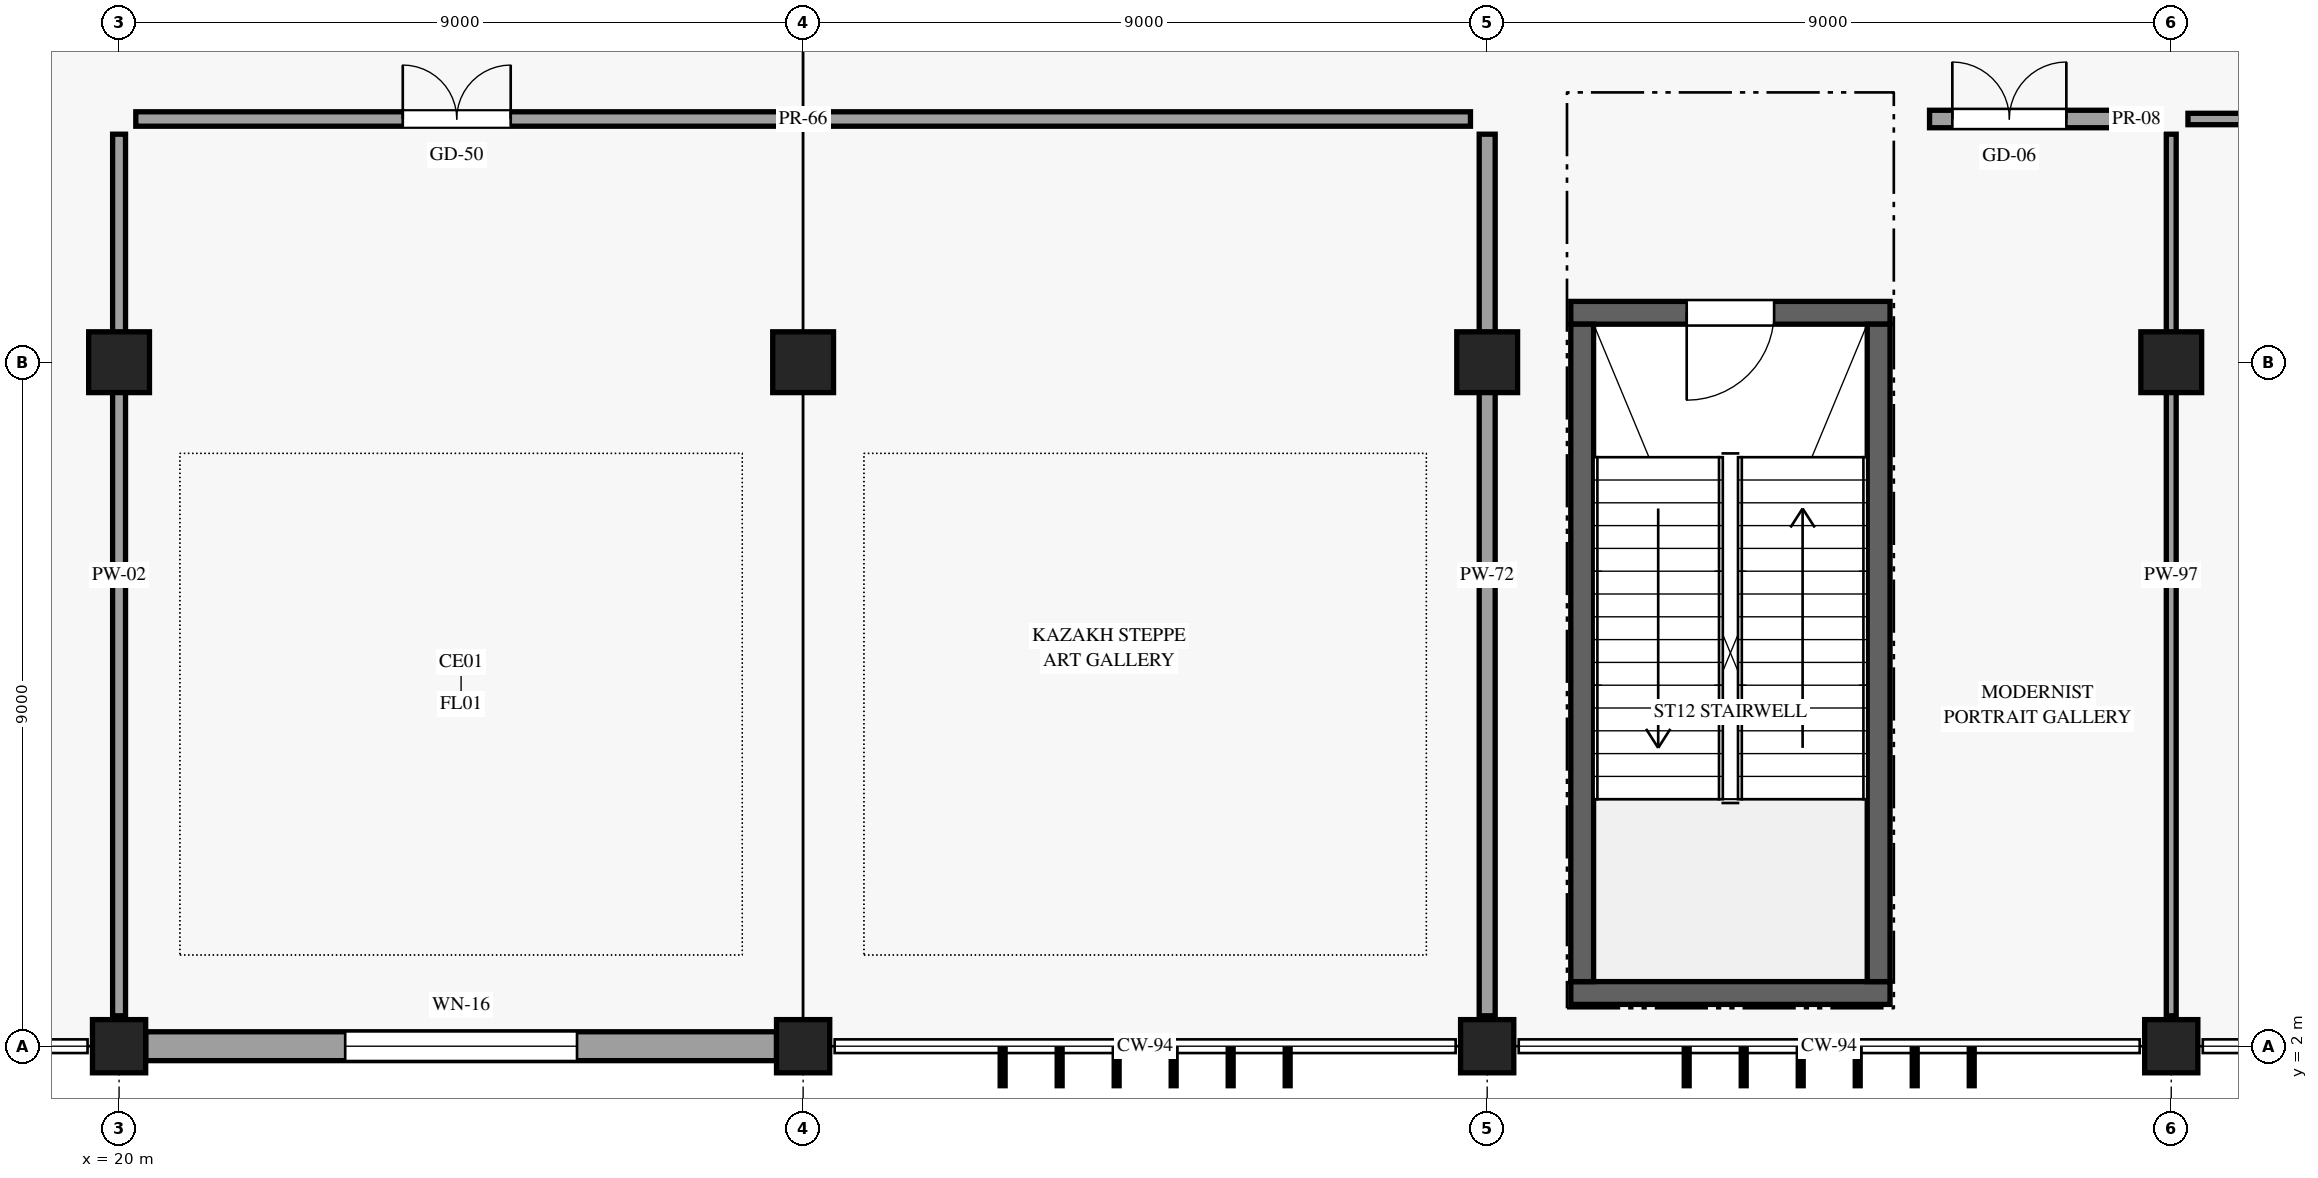
"""IFC4 building model, lengths in metres.
Left out: names, types, materials, properties, quantities, classifications, styles, units other than length and angle.
Written with IfcOpenShell. Run it as: python <this file> out.ifc"""

import sys

from ifc_helpers import new_model, si_unit, direction, frame, frame_2d, origin, origin_2d, place, context, subcontext, project, spatial, rectangle, circle, extrude, element, fill, save


model = new_model("IFC4")
c1 = context("Model", 3, precision=1e-05, world=origin(), true_north=direction((0.0, 1.0)))
c2 = subcontext(c1, "Body", "Model", "MODEL_VIEW")
j1 = project(units=[si_unit("LENGTHUNIT", "METRE"), si_unit("PLANEANGLEUNIT", "RADIAN")], contexts=[c1])
p1 = place(None, origin())
s1 = spatial("IfcSite", under=j1, at=p1, CompositionType="ELEMENT")
p2 = place(p1, origin())
s2 = spatial("IfcBuilding", under=s1, at=p2, CompositionType="ELEMENT")
p3 = place(p2, frame((0.0, 0.0, 5.4)))
s3 = spatial("IfcBuildingStorey", under=s2, at=p3, CompositionType="ELEMENT", Elevation=5.4)
p4 = place(p3, frame((20.0, 2.0, 0.0), z_axis=(0.0, 0.0, 1.0), x_axis=(1.0, 0.0, 0.0)))
e1 = element("IfcColumn", 1, at=p4, inside=s3, PredefinedType="COLUMN", context=c2, shape_type="SweptSolid", body=[
    extrude(rectangle(XDim=0.7, YDim=0.7, at=origin_2d()), origin(), (0.0, 0.0, 1.0), 4.8),
])
p5 = place(p3, frame((20.0, 11.0, 0.0), z_axis=(0.0, 0.0, 1.0), x_axis=(1.0, 0.0, 0.0)))
e2 = element("IfcColumn", 2, at=p5, inside=s3, PredefinedType="COLUMN", context=c2, shape_type="SweptSolid", body=[
    extrude(circle(Radius=0.4, at=origin_2d()), origin(), (0.0, 0.0, 1.0), 4.8),
])
p6 = place(p3, frame((29.0, 2.0, 0.0), z_axis=(0.0, 0.0, 1.0), x_axis=(1.0, 0.0, 0.0)))
e3 = element("IfcColumn", 3, at=p6, inside=s3, PredefinedType="COLUMN", context=c2, shape_type="SweptSolid", body=[
    extrude(rectangle(XDim=0.7, YDim=0.7, at=origin_2d()), origin(), (0.0, 0.0, 1.0), 4.8),
])
p7 = place(p3, frame((29.0, 11.0, 0.0), z_axis=(0.0, 0.0, 1.0), x_axis=(1.0, 0.0, 0.0)))
e4 = element("IfcColumn", 4, at=p7, inside=s3, PredefinedType="COLUMN", context=c2, shape_type="SweptSolid", body=[
    extrude(circle(Radius=0.4, at=origin_2d()), origin(), (0.0, 0.0, 1.0), 4.8),
])
p8 = place(p3, frame((38.0, 2.0, 0.0), z_axis=(0.0, 0.0, 1.0), x_axis=(1.0, 0.0, 0.0)))
e5 = element("IfcColumn", 5, at=p8, inside=s3, PredefinedType="COLUMN", context=c2, shape_type="SweptSolid", body=[
    extrude(rectangle(XDim=0.7, YDim=0.7, at=origin_2d()), origin(), (0.0, 0.0, 1.0), 4.8),
])
p9 = place(p3, frame((38.0, 11.0, 0.0), z_axis=(0.0, 0.0, 1.0), x_axis=(1.0, 0.0, 0.0)))
e6 = element("IfcColumn", 6, at=p9, inside=s3, PredefinedType="COLUMN", context=c2, shape_type="SweptSolid", body=[
    extrude(circle(Radius=0.4, at=origin_2d()), origin(), (0.0, 0.0, 1.0), 4.8),
])
p10 = place(p3, frame((47.0, 2.0, 0.0), z_axis=(0.0, 0.0, 1.0), x_axis=(1.0, 0.0, 0.0)))
e7 = element("IfcColumn", 7, at=p10, inside=s3, PredefinedType="COLUMN", context=c2, shape_type="SweptSolid", body=[
    extrude(rectangle(XDim=0.7, YDim=0.7, at=origin_2d()), origin(), (0.0, 0.0, 1.0), 4.8),
])
p11 = place(p3, frame((47.0, 11.0, 0.0), z_axis=(0.0, 0.0, 1.0), x_axis=(1.0, 0.0, 0.0)))
e8 = element("IfcColumn", 8, at=p11, inside=s3, PredefinedType="COLUMN", context=c2, shape_type="SweptSolid", body=[
    extrude(circle(Radius=0.4, at=origin_2d()), origin(), (0.0, 0.0, 1.0), 4.8),
])
p12 = place(p3, frame((20.35, 2.0, 0.0), z_axis=(0.0, 0.0, 1.0), x_axis=(1.0, 0.0, 0.0)))
e9 = element("IfcWall", 9, at=p12, inside=s3, PredefinedType="STANDARD", context=c2, shape_type="SweptSolid", body=[
    extrude(rectangle(XDim=8.3, YDim=0.38, at=frame_2d((4.15, 0.0))), origin(), (0.0, 0.0, 1.0), 3.575),
])
p13 = place(p12, frame((5.675, 0.0, 0.85), z_axis=(0.0, 0.0, 1.0), x_axis=(-1.0, 0.0, 0.0)))
e10 = element("IfcOpeningElement", 10, at=p13, cuts=e9, PredefinedType="OPENING", context=c2, shape_type="SweptSolid", body=[
    extrude(rectangle(XDim=3.05, YDim=2.5, at=frame_2d((1.525, 1.25))), frame((0.0, 0.2, 0.0), z_axis=(0.0, -1.0, 0.0), x_axis=(1.0, 0.0, 0.0)), (0.0, 0.0, 1.0), 0.4),
])
p14 = place(p3, frame((39.1, 11.65, 0.0), z_axis=(0.0, 0.0, 1.0), x_axis=(1.0, 0.0, 0.0)))
e11 = element("IfcWall", 11, at=p14, inside=s3, PredefinedType="SHEAR", context=c2, shape_type="SweptSolid", body=[
    extrude(rectangle(XDim=4.2, YDim=0.3, at=frame_2d((2.1, 0.0))), origin(), (0.0, 0.0, 1.0), 4.44),
])
p15 = place(p14, frame((2.675, 0.0, 0.0), z_axis=(0.0, 0.0, 1.0), x_axis=(-1.0, 0.0, 0.0)))
e12 = element("IfcOpeningElement", 12, at=p15, cuts=e11, PredefinedType="OPENING", context=c2, shape_type="SweptSolid", body=[
    extrude(rectangle(XDim=1.15, YDim=2.2, at=frame_2d((0.575, 1.1))), frame((0.0, 0.16, 0.0), z_axis=(0.0, -1.0, 0.0), x_axis=(1.0, 0.0, 0.0)), (0.0, 0.0, 1.0), 0.32),
])
p16 = place(p3, frame((39.1, 2.7, 0.0), z_axis=(0.0, 0.0, 1.0), x_axis=(1.0, 0.0, 0.0)))
e13 = element("IfcWall", 13, at=p16, inside=s3, PredefinedType="SHEAR", context=c2, shape_type="SweptSolid", body=[
    extrude(rectangle(XDim=4.2, YDim=0.3, at=frame_2d((2.1, 0.0))), origin(), (0.0, 0.0, 1.0), 4.44),
])
for number, where, z_axis, x_axis in (
    (14, (39.25, 2.85, 0.0), (0.0, 0.0, 1.0), (0.0, 1.0, 0.0)),
    (15, (43.15, 2.85, 0.0), (0.0, 0.0, 1.0), (0.0, 1.0, 0.0)),
):
    element("IfcWall", number, at=place(p3, frame(where, z_axis=z_axis, x_axis=x_axis)), inside=s3, PredefinedType="SHEAR", context=c2, shape_type="SweptSolid", body=[
        extrude(rectangle(XDim=8.65, YDim=0.3, at=frame_2d((4.325, 0.0))), origin(), (0.0, 0.0, 1.0), 4.44),
    ])
p17 = place(p3, frame((20.0, 2.4, 0.0), z_axis=(0.0, 0.0, 1.0), x_axis=(0.0, 1.0, 0.0)))
e16 = element("IfcWall", 16, at=p17, inside=s3, PredefinedType="PARTITIONING", context=c2, shape_type="SweptSolid", body=[
    extrude(rectangle(XDim=11.6, YDim=0.17, at=frame_2d((5.8, 0.0))), origin(), (0.0, 0.0, 1.0), 3.575),
])
p18 = place(p3, frame((20.22, 14.2, 0.0), z_axis=(0.0, 0.0, 1.0), x_axis=(1.0, 0.0, 0.0)))
e17 = element("IfcWall", 17, at=p18, inside=s3, PredefinedType="PARTITIONING", context=c2, shape_type="SweptSolid", body=[
    extrude(rectangle(XDim=17.56, YDim=0.19, at=frame_2d((8.78, 0.0))), origin(), (0.0, 0.0, 1.0), 3.575),
])
p19 = place(p18, frame((3.512, 0.0, 0.0)))
e18 = element("IfcOpeningElement", 18, at=p19, cuts=e17, PredefinedType="OPENING", context=c2, shape_type="SweptSolid", body=[
    extrude(rectangle(XDim=1.42, YDim=2.3, at=frame_2d((0.71, 1.15))), frame((0.0, 0.105, 0.0), z_axis=(0.0, -1.0, 0.0), x_axis=(1.0, 0.0, 0.0)), (0.0, 0.0, 1.0), 0.21),
])
p20 = place(p3, frame((38.0, 2.4, 0.0), z_axis=(0.0, 0.0, 1.0), x_axis=(0.0, 1.0, 0.0)))
e19 = element("IfcWall", 19, at=p20, inside=s3, PredefinedType="PARTITIONING", context=c2, shape_type="SweptSolid", body=[
    extrude(rectangle(XDim=11.6, YDim=0.21, at=frame_2d((5.8, 0.0))), origin(), (0.0, 0.0, 1.0), 3.575),
])
p21 = place(p3, frame((43.82, 14.2, 0.0), z_axis=(0.0, 0.0, 1.0), x_axis=(1.0, 0.0, 0.0)))
e20 = element("IfcWall", 20, at=p21, inside=s3, PredefinedType="PARTITIONING", context=c2, shape_type="SweptSolid", body=[
    extrude(rectangle(XDim=2.96, YDim=0.23, at=frame_2d((1.48, 0.0))), origin(), (0.0, 0.0, 1.0), 3.575),
])
p22 = place(p21, frame((0.3, 0.0, 0.0)))
e21 = element("IfcOpeningElement", 21, at=p22, cuts=e20, PredefinedType="OPENING", context=c2, shape_type="SweptSolid", body=[
    extrude(rectangle(XDim=1.5, YDim=2.35, at=frame_2d((0.75, 1.175))), frame((0.0, 0.125, 0.0), z_axis=(0.0, -1.0, 0.0), x_axis=(1.0, 0.0, 0.0)), (0.0, 0.0, 1.0), 0.25),
])
p23 = place(p3, frame((47.0, 2.4, 0.0), z_axis=(0.0, 0.0, 1.0), x_axis=(0.0, 1.0, 0.0)))
e22 = element("IfcWall", 22, at=p23, inside=s3, PredefinedType="PARTITIONING", context=c2, shape_type="SweptSolid", body=[
    extrude(rectangle(XDim=11.6, YDim=0.13, at=frame_2d((5.8, 0.0))), origin(), (0.0, 0.0, 1.0), 3.575),
])
p24 = place(p3, frame((47.22, 14.2, 0.0), z_axis=(0.0, 0.0, 1.0), x_axis=(1.0, 0.0, 0.0)))
e23 = element("IfcWall", 23, at=p24, inside=s3, PredefinedType="PARTITIONING", context=c2, shape_type="SweptSolid", body=[
    extrude(rectangle(XDim=9.78, YDim=0.15, at=frame_2d((4.89, 0.0))), origin(), (0.0, 0.0, 1.0), 3.175),
])
p25 = place(p24, frame((3.534, 0.0, 0.0)))
e24 = element("IfcOpeningElement", 24, at=p25, cuts=e23, PredefinedType="OPENING", context=c2, shape_type="SweptSolid", body=[
    extrude(rectangle(XDim=1.58, YDim=2.38, at=frame_2d((0.79, 1.19))), frame((0.0, 0.085, 0.0), z_axis=(0.0, -1.0, 0.0), x_axis=(1.0, 0.0, 0.0)), (0.0, 0.0, 1.0), 0.17),
])
p26 = place(p13, origin())
e25 = element("IfcWindow", 25, at=p26, inside=s3, PartitioningType="SINGLE_PANEL", PredefinedType="WINDOW", context=c2, shape_type="SweptSolid", body=[
    extrude(rectangle(XDim=3.05, YDim=2.5, at=frame_2d((1.525, 1.25))), frame((0.0, 0.03, 0.0), z_axis=(0.0, -1.0, 0.0), x_axis=(1.0, 0.0, 0.0)), (0.0, 0.0, 1.0), 0.06),
])
fill(e10, e25)
p27 = place(p15, origin())
e26 = element("IfcDoor", 26, at=p27, inside=s3, OperationType="SINGLE_SWING_RIGHT", PredefinedType="DOOR", context=c2, shape_type="SweptSolid", body=[
    extrude(rectangle(XDim=1.15, YDim=2.2, at=frame_2d((0.575, 1.1))), frame((0.0, 0.025, 0.0), z_axis=(0.0, -1.0, 0.0), x_axis=(1.0, 0.0, 0.0)), (0.0, 0.0, 1.0), 0.05),
])
fill(e12, e26)
p28 = place(p19, origin())
e27 = element("IfcDoor", 27, at=p28, inside=s3, OperationType="DOUBLE_DOOR_SINGLE_SWING", PredefinedType="DOOR", context=c2, shape_type="SweptSolid", body=[
    extrude(rectangle(XDim=1.42, YDim=2.3, at=frame_2d((0.71, 1.15))), frame((0.0, 0.025, 0.0), z_axis=(0.0, -1.0, 0.0), x_axis=(1.0, 0.0, 0.0)), (0.0, 0.0, 1.0), 0.05),
])
fill(e18, e27)
p29 = place(p22, origin())
e28 = element("IfcDoor", 28, at=p29, inside=s3, OperationType="DOUBLE_DOOR_SINGLE_SWING", PredefinedType="DOOR", context=c2, shape_type="SweptSolid", body=[
    extrude(rectangle(XDim=1.5, YDim=2.35, at=frame_2d((0.75, 1.175))), frame((0.0, 0.025, 0.0), z_axis=(0.0, -1.0, 0.0), x_axis=(1.0, 0.0, 0.0)), (0.0, 0.0, 1.0), 0.05),
])
fill(e21, e28)
save(model, sys.argv[1])
